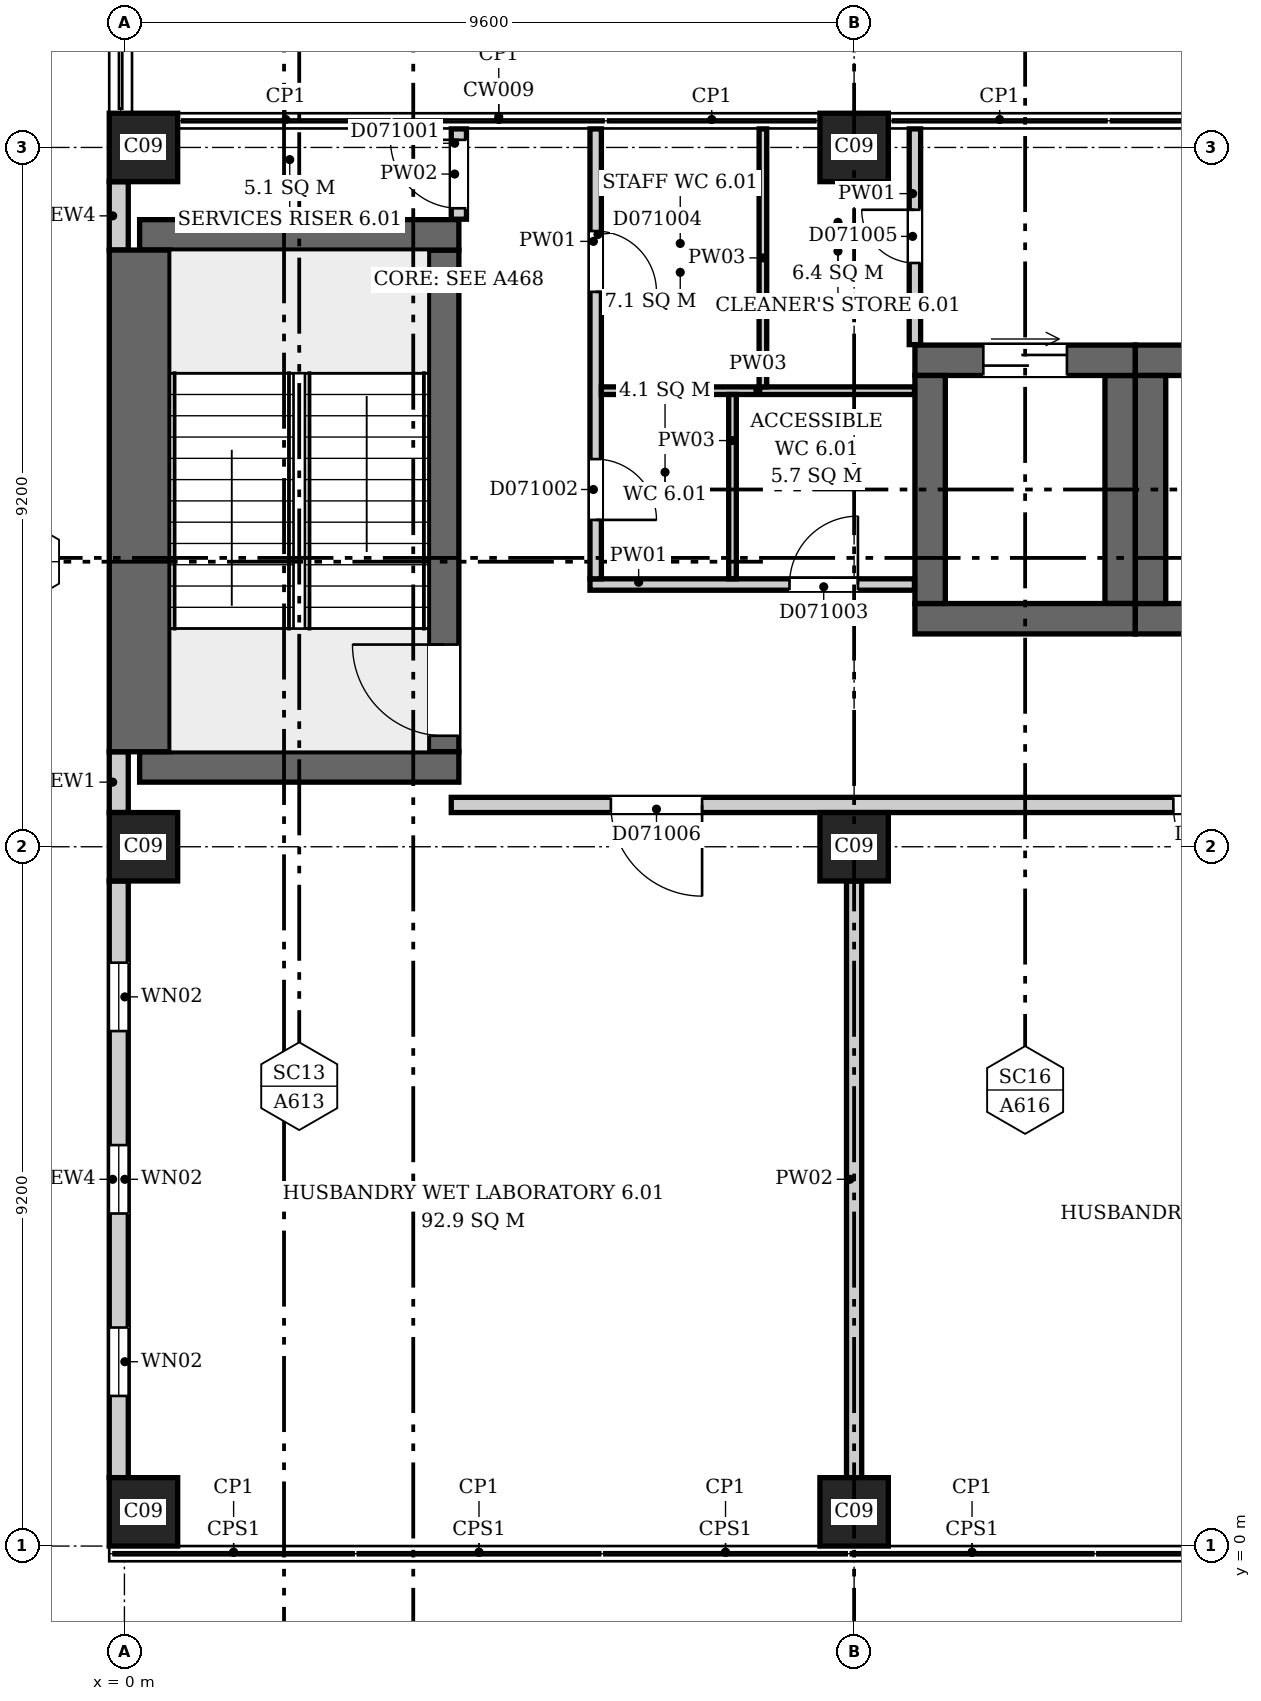
"""IFC4 building model, lengths in metres.
Left out: names, types, materials, properties, quantities, classifications, styles, units other than length and angle.
Written with IfcOpenShell. Run it as: python <this file> out.ifc"""

import sys

from ifc_helpers import new_model, si_unit, direction, frame, frame_2d, origin, origin_2d, place, context, subcontext, project, spatial, rectangle, extrude, element, fill, save


model = new_model("IFC4")
c1 = context("Model", 3, precision=1e-05, world=origin(), true_north=direction((0.0, 1.0)))
c2 = subcontext(c1, "Body", "Model", "MODEL_VIEW")
j1 = project(units=[si_unit("LENGTHUNIT", "METRE"), si_unit("PLANEANGLEUNIT", "RADIAN")], contexts=[c1])
p1 = place(None, origin())
s1 = spatial("IfcSite", under=j1, at=p1, CompositionType="ELEMENT")
p2 = place(p1, origin())
s2 = spatial("IfcBuilding", under=s1, at=p2, CompositionType="ELEMENT")
p3 = place(p2, frame((0.0, 0.0, 36.1)))
s3 = spatial("IfcBuildingStorey", under=s2, at=p3, CompositionType="ELEMENT", Elevation=36.1)
for number, where, z_axis, x_axis in (
    (1, (0.2, 10.25, 0.0), (0.0, 0.0, 1.0), (1.0, 0.0, 0.0)),
    (2, (0.2, 17.25, 0.0), (0.0, 0.0, 1.0), (1.0, 0.0, 0.0)),
):
    element("IfcWall", number, at=place(p3, frame(where, z_axis=z_axis, x_axis=x_axis)), inside=s3, PredefinedType="SHEAR", context=c2, shape_type="SweptSolid", body=[
        extrude(rectangle(XDim=4.2, YDim=0.4, at=frame_2d((2.1, 0.0))), origin(), (0.0, 0.0, 1.0), 4.2),
    ])
p4 = place(p3, frame((0.2, 10.45, 0.0), z_axis=(0.0, 0.0, 1.0), x_axis=(0.0, 1.0, 0.0)))
e3 = element("IfcWall", 3, at=p4, inside=s3, PredefinedType="SHEAR", context=c2, shape_type="SweptSolid", body=[
    extrude(rectangle(XDim=6.6, YDim=0.8, at=frame_2d((3.3, 0.0))), origin(), (0.0, 0.0, 1.0), 4.2),
])
p5 = place(p3, frame((4.2, 10.45, 0.0), z_axis=(0.0, 0.0, 1.0), x_axis=(0.0, 1.0, 0.0)))
e4 = element("IfcWall", 4, at=p5, inside=s3, PredefinedType="SHEAR", context=c2, shape_type="SweptSolid", body=[
    extrude(rectangle(XDim=6.6, YDim=0.4, at=frame_2d((3.3, 0.0))), origin(), (0.0, 0.0, 1.0), 4.2),
])
p6 = place(p5, frame((0.21, 0.0, 0.0)))
e5 = element("IfcOpeningElement", 5, at=p6, cuts=e4, PredefinedType="OPENING", context=c2, shape_type="SweptSolid", body=[
    extrude(rectangle(XDim=1.2, YDim=2.1, at=frame_2d((0.6, 1.05))), frame((0.0, 0.21, 0.0), z_axis=(0.0, -1.0, 0.0), x_axis=(1.0, 0.0, 0.0)), (0.0, 0.0, 1.0), 0.42),
])
p7 = place(p3, frame((10.4, 12.2, 0.0), z_axis=(0.0, 0.0, 1.0), x_axis=(1.0, 0.0, 0.0)))
e6 = element("IfcWall", 6, at=p7, inside=s3, PredefinedType="SHEAR", context=c2, shape_type="SweptSolid", body=[
    extrude(rectangle(XDim=2.9, YDim=0.4, at=frame_2d((1.45, 0.0))), origin(), (0.0, 0.0, 1.0), 4.2),
])
p8 = place(p3, frame((10.4, 15.6, 0.0), z_axis=(0.0, 0.0, 1.0), x_axis=(1.0, 0.0, 0.0)))
e7 = element("IfcWall", 7, at=p8, inside=s3, PredefinedType="SHEAR", context=c2, shape_type="SweptSolid", body=[
    extrude(rectangle(XDim=2.9, YDim=0.4, at=frame_2d((1.45, 0.0))), origin(), (0.0, 0.0, 1.0), 4.2),
])
p9 = place(p8, frame((0.9, 0.0, 0.0)))
e8 = element("IfcOpeningElement", 8, at=p9, cuts=e7, PredefinedType="OPENING", context=c2, shape_type="SweptSolid", body=[
    extrude(rectangle(XDim=1.1, YDim=2.1, at=frame_2d((0.55, 1.05))), frame((0.0, 0.21, 0.0), z_axis=(0.0, -1.0, 0.0), x_axis=(1.0, 0.0, 0.0)), (0.0, 0.0, 1.0), 0.42),
])
for number, where, z_axis, x_axis in (
    (9, (10.6, 12.4, 0.0), (0.0, 0.0, 1.0), (0.0, 1.0, 0.0)),
    (10, (13.1, 12.4, 0.0), (0.0, 0.0, 1.0), (0.0, 1.0, 0.0)),
):
    element("IfcWall", number, at=place(p3, frame(where, z_axis=z_axis, x_axis=x_axis)), inside=s3, PredefinedType="SHEAR", context=c2, shape_type="SweptSolid", body=[
        extrude(rectangle(XDim=3.0, YDim=0.4, at=frame_2d((1.5, 0.0))), origin(), (0.0, 0.0, 1.0), 4.2),
    ])
p10 = place(p3, frame((13.3, 12.2, 0.0), z_axis=(0.0, 0.0, 1.0), x_axis=(1.0, 0.0, 0.0)))
e11 = element("IfcWall", 11, at=p10, inside=s3, PredefinedType="SHEAR", context=c2, shape_type="SweptSolid", body=[
    extrude(rectangle(XDim=2.9, YDim=0.4, at=frame_2d((1.45, 0.0))), origin(), (0.0, 0.0, 1.0), 4.2),
])
p11 = place(p3, frame((13.3, 15.6, 0.0), z_axis=(0.0, 0.0, 1.0), x_axis=(1.0, 0.0, 0.0)))
e12 = element("IfcWall", 12, at=p11, inside=s3, PredefinedType="SHEAR", context=c2, shape_type="SweptSolid", body=[
    extrude(rectangle(XDim=2.9, YDim=0.4, at=frame_2d((1.45, 0.0))), origin(), (0.0, 0.0, 1.0), 4.2),
])
p12 = place(p11, frame((0.9, 0.0, 0.0)))
e13 = element("IfcOpeningElement", 13, at=p12, cuts=e12, PredefinedType="OPENING", context=c2, shape_type="SweptSolid", body=[
    extrude(rectangle(XDim=1.1, YDim=2.1, at=frame_2d((0.55, 1.05))), frame((0.0, 0.21, 0.0), z_axis=(0.0, -1.0, 0.0), x_axis=(1.0, 0.0, 0.0)), (0.0, 0.0, 1.0), 0.42),
])
p13 = place(p3, frame((13.5, 12.4, 0.0), z_axis=(0.0, 0.0, 1.0), x_axis=(0.0, 1.0, 0.0)))
e14 = element("IfcWall", 14, at=p13, inside=s3, PredefinedType="SHEAR", context=c2, shape_type="SweptSolid", body=[
    extrude(rectangle(XDim=3.0, YDim=0.4, at=frame_2d((1.5, 0.0))), origin(), (0.0, 0.0, 1.0), 4.2),
])
for number, where, z_axis, x_axis in (
    (15, (0.25, 0.45, 0.0), (0.0, 0.0, 1.0), (1.0, 0.0, 0.0)),
    (16, (9.6, 0.45, 0.0), (0.0, 0.0, 1.0), (1.0, 0.0, 0.0)),
    (17, (0.25, 9.2, 0.0), (0.0, 0.0, 1.0), (1.0, 0.0, 0.0)),
    (18, (9.6, 9.2, 0.0), (0.0, 0.0, 1.0), (1.0, 0.0, 0.0)),
    (19, (0.25, 18.4, 0.0), (0.0, 0.0, 1.0), (1.0, 0.0, 0.0)),
    (20, (9.6, 18.4, 0.0), (0.0, 0.0, 1.0), (1.0, 0.0, 0.0)),
):
    element("IfcColumn", number, at=place(p3, frame(where, z_axis=z_axis, x_axis=x_axis)), inside=s3, PredefinedType="COLUMN", context=c2, shape_type="SweptSolid", body=[
        extrude(rectangle(XDim=0.9, YDim=0.9, at=origin_2d()), origin(), (0.0, 0.0, 1.0), 4.2),
    ])
p14 = place(p3, frame((-0.074, 8.75, 0.0), z_axis=(0.0, 0.0, 1.0), x_axis=(0.0, -1.0, 0.0)))
e21 = element("IfcWall", 21, at=p14, inside=s3, PredefinedType="ELEMENTEDWALL", context=c2, shape_type="SweptSolid", body=[
    extrude(rectangle(XDim=7.85, YDim=0.25, at=frame_2d((3.925, 0.0))), origin(), (0.0, 0.0, 1.0), 3.9),
])
p15 = place(p14, frame((5.875, 0.0, 0.9)))
e22 = element("IfcOpeningElement", 22, at=p15, cuts=e21, PredefinedType="OPENING", context=c2, shape_type="SweptSolid", body=[
    extrude(rectangle(XDim=0.9, YDim=2.6, at=frame_2d((0.45, 1.3))), frame((0.0, 0.135, 0.0), z_axis=(0.0, -1.0, 0.0), x_axis=(1.0, 0.0, 0.0)), (0.0, 0.0, 1.0), 0.27),
])
p16 = place(p14, frame((3.475, 0.0, 0.9)))
e23 = element("IfcOpeningElement", 23, at=p16, cuts=e21, PredefinedType="OPENING", context=c2, shape_type="SweptSolid", body=[
    extrude(rectangle(XDim=0.9, YDim=2.6, at=frame_2d((0.45, 1.3))), frame((0.0, 0.135, 0.0), z_axis=(0.0, -1.0, 0.0), x_axis=(1.0, 0.0, 0.0)), (0.0, 0.0, 1.0), 0.27),
])
p17 = place(p14, frame((1.075, 0.0, 0.9)))
e24 = element("IfcOpeningElement", 24, at=p17, cuts=e21, PredefinedType="OPENING", context=c2, shape_type="SweptSolid", body=[
    extrude(rectangle(XDim=0.9, YDim=2.6, at=frame_2d((0.45, 1.3))), frame((0.0, 0.135, 0.0), z_axis=(0.0, -1.0, 0.0), x_axis=(1.0, 0.0, 0.0)), (0.0, 0.0, 1.0), 0.27),
])
p18 = place(p3, frame((-0.074, 10.45, 0.0), z_axis=(0.0, 0.0, 1.0), x_axis=(0.0, -1.0, 0.0)))
e25 = element("IfcWall", 25, at=p18, inside=s3, PredefinedType="ELEMENTEDWALL", context=c2, shape_type="SweptSolid", body=[
    extrude(rectangle(XDim=0.8, YDim=0.25, at=frame_2d((0.4, 0.0))), origin(), (0.0, 0.0, 1.0), 3.9),
])
p19 = place(p3, frame((-0.074, 17.95, 0.0), z_axis=(0.0, 0.0, 1.0), x_axis=(0.0, -1.0, 0.0)))
e26 = element("IfcWall", 26, at=p19, inside=s3, PredefinedType="ELEMENTEDWALL", context=c2, shape_type="SweptSolid", body=[
    extrude(rectangle(XDim=0.9, YDim=0.25, at=frame_2d((0.45, 0.0))), origin(), (0.0, 0.0, 1.0), 3.9),
])
p20 = place(p3, frame((4.3, 9.75, 0.0), z_axis=(0.0, 0.0, 1.0), x_axis=(1.0, 0.0, 0.0)))
e27 = element("IfcWall", 27, at=p20, inside=s3, PredefinedType="PARTITIONING", context=c2, shape_type="SweptSolid", body=[
    extrude(rectangle(XDim=43.894, YDim=0.2, at=frame_2d((21.947, 0.0))), origin(), (0.0, 0.0, 1.0), 3.9),
])
p21 = place(p20, frame((2.1, 0.0, 0.0)))
e28 = element("IfcOpeningElement", 28, at=p21, cuts=e27, PredefinedType="OPENING", context=c2, shape_type="SweptSolid", body=[
    extrude(rectangle(XDim=1.2, YDim=2.1, at=frame_2d((0.6, 1.05))), frame((0.0, 0.11, 0.0), z_axis=(0.0, -1.0, 0.0), x_axis=(1.0, 0.0, 0.0)), (0.0, 0.0, 1.0), 0.22),
])
p22 = place(p20, frame((9.5, 0.0, 0.0)))
e29 = element("IfcOpeningElement", 29, at=p22, cuts=e27, PredefinedType="OPENING", context=c2, shape_type="SweptSolid", body=[
    extrude(rectangle(XDim=1.2, YDim=2.1, at=frame_2d((0.6, 1.05))), frame((0.0, 0.11, 0.0), z_axis=(0.0, -1.0, 0.0), x_axis=(1.0, 0.0, 0.0)), (0.0, 0.0, 1.0), 0.22),
])
p23 = place(p20, frame((19.1, 0.0, 0.0)))
e30 = element("IfcOpeningElement", 30, at=p23, cuts=e27, PredefinedType="OPENING", context=c2, shape_type="SweptSolid", body=[
    extrude(rectangle(XDim=1.2, YDim=2.1, at=frame_2d((0.6, 1.05))), frame((0.0, 0.11, 0.0), z_axis=(0.0, -1.0, 0.0), x_axis=(1.0, 0.0, 0.0)), (0.0, 0.0, 1.0), 0.22),
])
p24 = place(p20, frame((28.7, 0.0, 0.0)))
e31 = element("IfcOpeningElement", 31, at=p24, cuts=e27, PredefinedType="OPENING", context=c2, shape_type="SweptSolid", body=[
    extrude(rectangle(XDim=1.2, YDim=2.1, at=frame_2d((0.6, 1.05))), frame((0.0, 0.11, 0.0), z_axis=(0.0, -1.0, 0.0), x_axis=(1.0, 0.0, 0.0)), (0.0, 0.0, 1.0), 0.22),
])
p25 = place(p20, frame((38.4, 0.0, 0.0)))
e32 = element("IfcOpeningElement", 32, at=p25, cuts=e27, PredefinedType="OPENING", context=c2, shape_type="SweptSolid", body=[
    extrude(rectangle(XDim=1.2, YDim=2.1, at=frame_2d((0.6, 1.05))), frame((0.0, 0.11, 0.0), z_axis=(0.0, -1.0, 0.0), x_axis=(1.0, 0.0, 0.0)), (0.0, 0.0, 1.0), 0.22),
])
p26 = place(p3, frame((4.4, 17.456, 0.0), z_axis=(0.0, 0.0, 1.0), x_axis=(0.0, 1.0, 0.0)))
e33 = element("IfcWall", 33, at=p26, inside=s3, PredefinedType="PARTITIONING", context=c2, shape_type="SweptSolid", body=[
    extrude(rectangle(XDim=1.188, YDim=0.2, at=frame_2d((0.594, 0.0))), origin(), (0.0, 0.0, 1.0), 3.9),
])
p27 = place(p26, frame((0.144, 0.0, 0.0)))
e34 = element("IfcOpeningElement", 34, at=p27, cuts=e33, PredefinedType="OPENING", context=c2, shape_type="SweptSolid", body=[
    extrude(rectangle(XDim=0.9, YDim=2.1, at=frame_2d((0.45, 1.05))), frame((0.0, 0.11, 0.0), z_axis=(0.0, -1.0, 0.0), x_axis=(1.0, 0.0, 0.0)), (0.0, 0.0, 1.0), 0.22),
])
p28 = place(p3, frame((6.125, 12.65, 0.0), z_axis=(0.0, 0.0, 1.0), x_axis=(1.0, 0.0, 0.0)))
e35 = element("IfcWall", 35, at=p28, inside=s3, PredefinedType="PARTITIONING", context=c2, shape_type="SweptSolid", body=[
    extrude(rectangle(XDim=4.269, YDim=0.15, at=frame_2d((2.135, 0.0))), origin(), (0.0, 0.0, 1.0), 3.9),
])
p29 = place(p28, frame((2.625, 0.0, 0.0)))
e36 = element("IfcOpeningElement", 36, at=p29, cuts=e35, PredefinedType="OPENING", context=c2, shape_type="SweptSolid", body=[
    extrude(rectangle(XDim=0.9, YDim=2.1, at=frame_2d((0.45, 1.05))), frame((0.0, 0.085, 0.0), z_axis=(0.0, -1.0, 0.0), x_axis=(1.0, 0.0, 0.0)), (0.0, 0.0, 1.0), 0.17),
])
p30 = place(p3, frame((6.2, 12.725, 0.0), z_axis=(0.0, 0.0, 1.0), x_axis=(0.0, 1.0, 0.0)))
e37 = element("IfcWall", 37, at=p30, inside=s3, PredefinedType="PARTITIONING", context=c2, shape_type="SweptSolid", body=[
    extrude(rectangle(XDim=5.919, YDim=0.15, at=frame_2d((2.959, 0.0))), origin(), (0.0, 0.0, 1.0), 3.9),
])
p31 = place(p30, frame((0.775, 0.0, 0.0)))
e38 = element("IfcOpeningElement", 38, at=p31, cuts=e37, PredefinedType="OPENING", context=c2, shape_type="SweptSolid", body=[
    extrude(rectangle(XDim=0.8, YDim=2.1, at=frame_2d((0.4, 1.05))), frame((0.0, 0.085, 0.0), z_axis=(0.0, -1.0, 0.0), x_axis=(1.0, 0.0, 0.0)), (0.0, 0.0, 1.0), 0.17),
])
p32 = place(p30, frame((3.775, 0.0, 0.0)))
e39 = element("IfcOpeningElement", 39, at=p32, cuts=e37, PredefinedType="OPENING", context=c2, shape_type="SweptSolid", body=[
    extrude(rectangle(XDim=0.8, YDim=2.1, at=frame_2d((0.4, 1.05))), frame((0.0, 0.085, 0.0), z_axis=(0.0, -1.0, 0.0), x_axis=(1.0, 0.0, 0.0)), (0.0, 0.0, 1.0), 0.17),
])
p33 = place(p3, frame((6.275, 15.2, 0.0), z_axis=(0.0, 0.0, 1.0), x_axis=(1.0, 0.0, 0.0)))
e40 = element("IfcWall", 40, at=p33, inside=s3, PredefinedType="PARTITIONING", context=c2, shape_type="SweptSolid", body=[
    extrude(rectangle(XDim=4.119, YDim=0.1, at=frame_2d((2.06, 0.0))), origin(), (0.0, 0.0, 1.0), 3.9),
])
p34 = place(p3, frame((8.0, 12.725, 0.0), z_axis=(0.0, 0.0, 1.0), x_axis=(0.0, 1.0, 0.0)))
e41 = element("IfcWall", 41, at=p34, inside=s3, PredefinedType="PARTITIONING", context=c2, shape_type="SweptSolid", body=[
    extrude(rectangle(XDim=2.425, YDim=0.1, at=frame_2d((1.212, 0.0))), origin(), (0.0, 0.0, 1.0), 3.9),
])
p35 = place(p3, frame((8.4, 15.25, 0.0), z_axis=(0.0, 0.0, 1.0), x_axis=(0.0, 1.0, 0.0)))
e42 = element("IfcWall", 42, at=p35, inside=s3, PredefinedType="PARTITIONING", context=c2, shape_type="SweptSolid", body=[
    extrude(rectangle(XDim=3.394, YDim=0.1, at=frame_2d((1.697, 0.0))), origin(), (0.0, 0.0, 1.0), 3.9),
])
p36 = place(p3, frame((9.6, 0.9, 0.0), z_axis=(0.0, 0.0, 1.0), x_axis=(0.0, 1.0, 0.0)))
e43 = element("IfcWall", 43, at=p36, inside=s3, PredefinedType="PARTITIONING", context=c2, shape_type="SweptSolid", body=[
    extrude(rectangle(XDim=7.85, YDim=0.2, at=frame_2d((3.925, 0.0))), origin(), (0.0, 0.0, 1.0), 3.9),
])
p37 = place(p3, frame((10.4, 15.806, 0.0), z_axis=(0.0, 0.0, 1.0), x_axis=(0.0, 1.0, 0.0)))
e44 = element("IfcWall", 44, at=p37, inside=s3, PredefinedType="PARTITIONING", context=c2, shape_type="SweptSolid", body=[
    extrude(rectangle(XDim=2.838, YDim=0.15, at=frame_2d((1.419, 0.0))), origin(), (0.0, 0.0, 1.0), 3.9),
])
p38 = place(p37, frame((1.074, 0.0, 0.0)))
e45 = element("IfcOpeningElement", 45, at=p38, cuts=e44, PredefinedType="OPENING", context=c2, shape_type="SweptSolid", body=[
    extrude(rectangle(XDim=0.7, YDim=2.1, at=frame_2d((0.35, 1.05))), frame((0.0, 0.085, 0.0), z_axis=(0.0, -1.0, 0.0), x_axis=(1.0, 0.0, 0.0)), (0.0, 0.0, 1.0), 0.17),
])
p39 = place(p15, origin())
e46 = element("IfcWindow", 46, at=p39, inside=s3, PartitioningType="SINGLE_PANEL", PredefinedType="WINDOW", context=c2, shape_type="SweptSolid", body=[
    extrude(rectangle(XDim=0.9, YDim=2.6, at=frame_2d((0.45, 1.3))), frame((0.0, 0.03, 0.0), z_axis=(0.0, -1.0, 0.0), x_axis=(1.0, 0.0, 0.0)), (0.0, 0.0, 1.0), 0.06),
])
fill(e22, e46)
p40 = place(p16, origin())
e47 = element("IfcWindow", 47, at=p40, inside=s3, PartitioningType="SINGLE_PANEL", PredefinedType="WINDOW", context=c2, shape_type="SweptSolid", body=[
    extrude(rectangle(XDim=0.9, YDim=2.6, at=frame_2d((0.45, 1.3))), frame((0.0, 0.03, 0.0), z_axis=(0.0, -1.0, 0.0), x_axis=(1.0, 0.0, 0.0)), (0.0, 0.0, 1.0), 0.06),
])
fill(e23, e47)
p41 = place(p17, origin())
e48 = element("IfcWindow", 48, at=p41, inside=s3, PartitioningType="SINGLE_PANEL", PredefinedType="WINDOW", context=c2, shape_type="SweptSolid", body=[
    extrude(rectangle(XDim=0.9, YDim=2.6, at=frame_2d((0.45, 1.3))), frame((0.0, 0.03, 0.0), z_axis=(0.0, -1.0, 0.0), x_axis=(1.0, 0.0, 0.0)), (0.0, 0.0, 1.0), 0.06),
])
fill(e24, e48)
p42 = place(p6, origin())
e49 = element("IfcDoor", 49, at=p42, inside=s3, OperationType="SINGLE_SWING_RIGHT", PredefinedType="DOOR", context=c2, shape_type="SweptSolid", body=[
    extrude(rectangle(XDim=1.2, YDim=2.1, at=frame_2d((0.6, 1.05))), frame((0.0, 0.025, 0.0), z_axis=(0.0, -1.0, 0.0), x_axis=(1.0, 0.0, 0.0)), (0.0, 0.0, 1.0), 0.05),
])
fill(e5, e49)
p43 = place(p9, origin())
e50 = element("IfcDoor", 50, at=p43, inside=s3, OperationType="DOUBLE_DOOR_SLIDING", PredefinedType="DOOR", context=c2, shape_type="SweptSolid", body=[
    extrude(rectangle(XDim=1.1, YDim=2.1, at=frame_2d((0.55, 1.05))), frame((0.0, 0.025, 0.0), z_axis=(0.0, -1.0, 0.0), x_axis=(1.0, 0.0, 0.0)), (0.0, 0.0, 1.0), 0.05),
])
fill(e8, e50)
p44 = place(p27, origin())
e51 = element("IfcDoor", 51, at=p44, inside=s3, OperationType="SINGLE_SWING_LEFT", PredefinedType="DOOR", context=c2, shape_type="SweptSolid", body=[
    extrude(rectangle(XDim=0.9, YDim=2.1, at=frame_2d((0.45, 1.05))), frame((0.0, 0.025, 0.0), z_axis=(0.0, -1.0, 0.0), x_axis=(1.0, 0.0, 0.0)), (0.0, 0.0, 1.0), 0.05),
])
fill(e34, e51)
p45 = place(p31, origin())
e52 = element("IfcDoor", 52, at=p45, inside=s3, OperationType="SINGLE_SWING_LEFT", PredefinedType="DOOR", context=c2, shape_type="SweptSolid", body=[
    extrude(rectangle(XDim=0.8, YDim=2.1, at=frame_2d((0.4, 1.05))), frame((0.0, 0.025, 0.0), z_axis=(0.0, -1.0, 0.0), x_axis=(1.0, 0.0, 0.0)), (0.0, 0.0, 1.0), 0.05),
])
fill(e38, e52)
p46 = place(p29, origin())
e53 = element("IfcDoor", 53, at=p46, inside=s3, OperationType="SINGLE_SWING_RIGHT", PredefinedType="DOOR", context=c2, shape_type="SweptSolid", body=[
    extrude(rectangle(XDim=0.9, YDim=2.1, at=frame_2d((0.45, 1.05))), frame((0.0, 0.025, 0.0), z_axis=(0.0, -1.0, 0.0), x_axis=(1.0, 0.0, 0.0)), (0.0, 0.0, 1.0), 0.05),
])
fill(e36, e53)
p47 = place(p32, origin())
e54 = element("IfcDoor", 54, at=p47, inside=s3, OperationType="SINGLE_SWING_LEFT", PredefinedType="DOOR", context=c2, shape_type="SweptSolid", body=[
    extrude(rectangle(XDim=0.8, YDim=2.1, at=frame_2d((0.4, 1.05))), frame((0.0, 0.025, 0.0), z_axis=(0.0, -1.0, 0.0), x_axis=(1.0, 0.0, 0.0)), (0.0, 0.0, 1.0), 0.05),
])
fill(e39, e54)
p48 = place(p38, origin())
e55 = element("IfcDoor", 55, at=p48, inside=s3, OperationType="SINGLE_SWING_LEFT", PredefinedType="DOOR", context=c2, shape_type="SweptSolid", body=[
    extrude(rectangle(XDim=0.7, YDim=2.1, at=frame_2d((0.35, 1.05))), frame((0.0, 0.025, 0.0), z_axis=(0.0, -1.0, 0.0), x_axis=(1.0, 0.0, 0.0)), (0.0, 0.0, 1.0), 0.05),
])
fill(e45, e55)
p49 = place(p21, origin())
e56 = element("IfcDoor", 56, at=p49, inside=s3, OperationType="SINGLE_SWING_RIGHT", PredefinedType="DOOR", context=c2, shape_type="SweptSolid", body=[
    extrude(rectangle(XDim=1.2, YDim=2.1, at=frame_2d((0.6, 1.05))), frame((0.0, 0.025, 0.0), z_axis=(0.0, -1.0, 0.0), x_axis=(1.0, 0.0, 0.0)), (0.0, 0.0, 1.0), 0.05),
])
fill(e28, e56)
p50 = place(p22, origin())
e57 = element("IfcDoor", 57, at=p50, inside=s3, OperationType="SINGLE_SWING_RIGHT", PredefinedType="DOOR", context=c2, shape_type="SweptSolid", body=[
    extrude(rectangle(XDim=1.2, YDim=2.1, at=frame_2d((0.6, 1.05))), frame((0.0, 0.025, 0.0), z_axis=(0.0, -1.0, 0.0), x_axis=(1.0, 0.0, 0.0)), (0.0, 0.0, 1.0), 0.05),
])
fill(e29, e57)
save(model, sys.argv[1])
